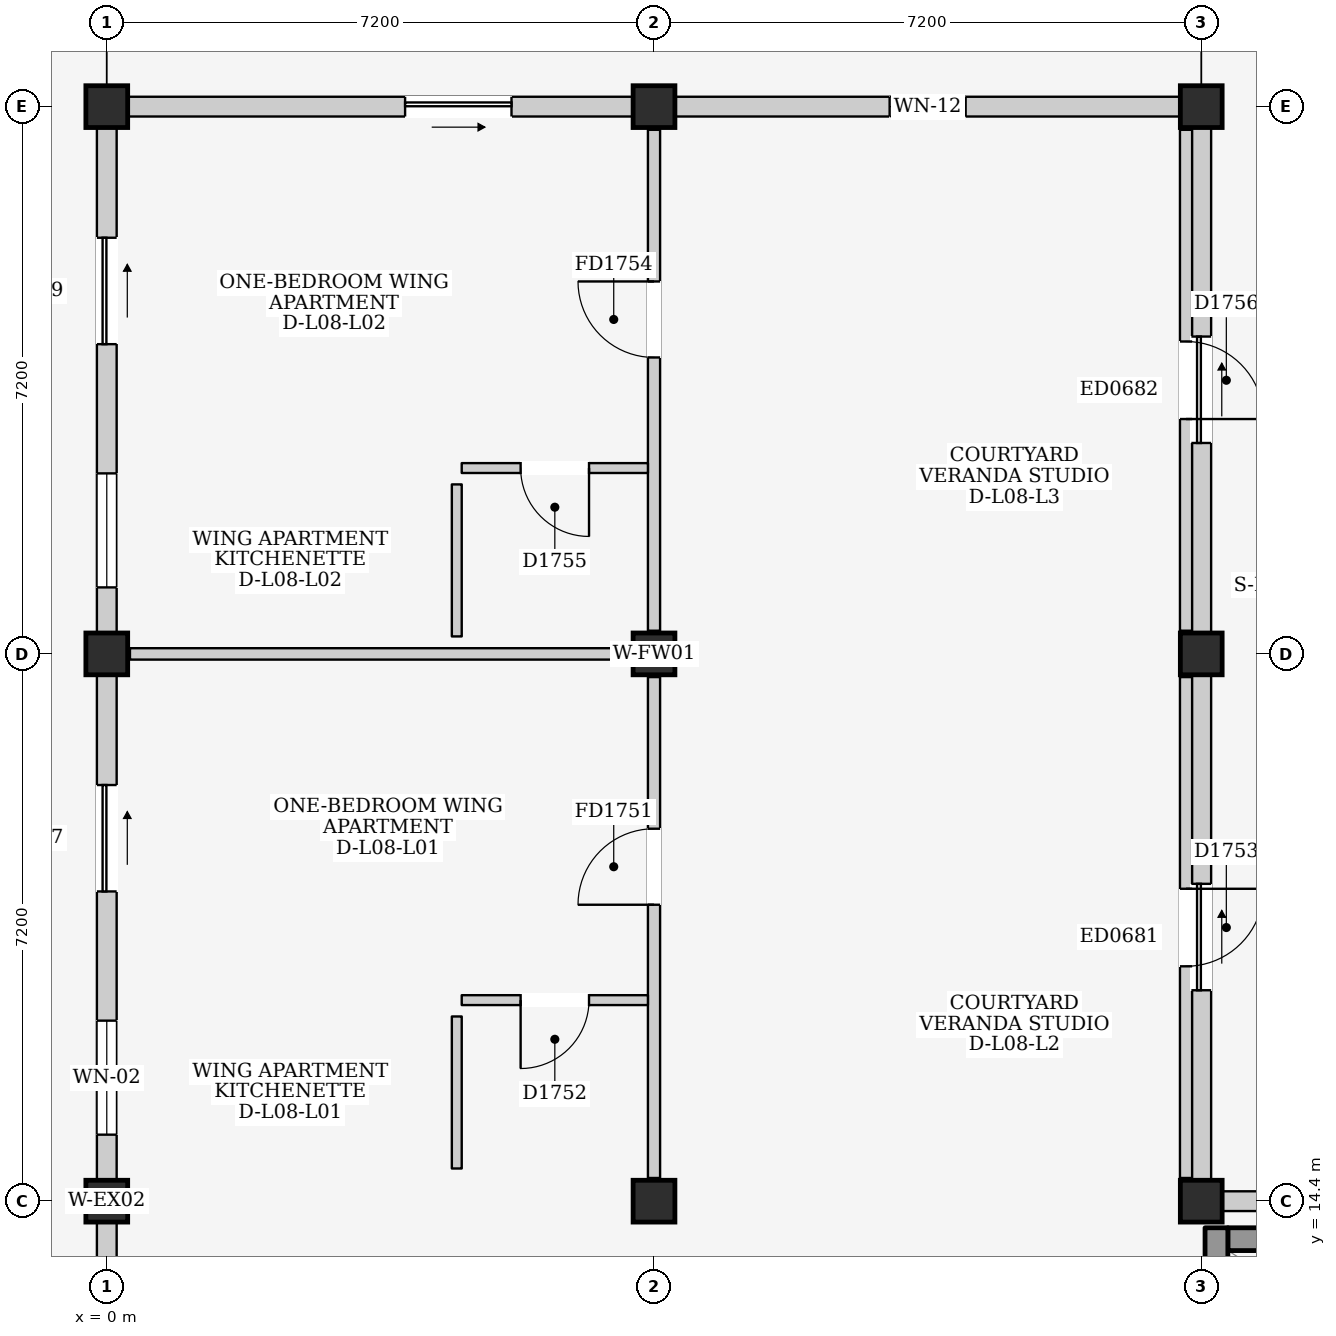
"""IFC4 building model, lengths in metres.
Left out: names, types, materials, properties, quantities, classifications, styles, units other than length and angle.
Written with IfcOpenShell. Run it as: python <this file> out.ifc"""

import sys

from ifc_helpers import new_model, si_unit, direction, frame, frame_2d, origin, origin_2d, place, context, subcontext, project, spatial, rectangle, extrude, element, fill, save


model = new_model("IFC4")
c1 = context("Model", 3, precision=1e-05, world=origin(), true_north=direction((0.0, 1.0)))
c2 = subcontext(c1, "Body", "Model", "MODEL_VIEW")
j1 = project(units=[si_unit("LENGTHUNIT", "METRE"), si_unit("PLANEANGLEUNIT", "RADIAN")], contexts=[c1])
p1 = place(None, origin())
s1 = spatial("IfcSite", under=j1, at=p1, CompositionType="ELEMENT")
p2 = place(p1, origin())
s2 = spatial("IfcBuilding", under=s1, at=p2, CompositionType="ELEMENT")
p3 = place(p2, frame((0.0, 0.0, 28.3)))
s3 = spatial("IfcBuildingStorey", under=s2, at=p3, CompositionType="ELEMENT", Elevation=28.3)
for number, where, z_axis, x_axis in (
    (1, (0.0, 14.4, 0.0), (0.0, 0.0, 1.0), (1.0, 0.0, 0.0)),
    (2, (0.0, 21.6, 0.0), (0.0, 0.0, 1.0), (1.0, 0.0, 0.0)),
    (3, (0.0, 28.8, 0.0), (0.0, 0.0, 1.0), (1.0, 0.0, 0.0)),
    (4, (7.2, 14.4, 0.0), (0.0, 0.0, 1.0), (1.0, 0.0, 0.0)),
    (5, (7.2, 21.6, 0.0), (0.0, 0.0, 1.0), (1.0, 0.0, 0.0)),
    (6, (7.2, 28.8, 0.0), (0.0, 0.0, 1.0), (1.0, 0.0, 0.0)),
    (7, (14.4, 14.4, 0.0), (0.0, 0.0, 1.0), (1.0, 0.0, 0.0)),
    (8, (14.4, 21.6, 0.0), (0.0, 0.0, 1.0), (1.0, 0.0, 0.0)),
    (9, (14.4, 28.8, 0.0), (0.0, 0.0, 1.0), (1.0, 0.0, 0.0)),
):
    element("IfcColumn", number, at=place(p3, frame(where, z_axis=z_axis, x_axis=x_axis)), inside=s3, PredefinedType="COLUMN", context=c2, shape_type="SweptSolid", body=[
        extrude(rectangle(XDim=0.55, YDim=0.55, at=origin_2d()), origin(), (0.0, 0.0, 1.0), 3.2),
    ])
p4 = place(p3, frame((0.0, 7.475, 0.0), z_axis=(0.0, 0.0, 1.0), x_axis=(0.0, 1.0, 0.0)))
e10 = element("IfcWall", 10, at=p4, inside=s3, PredefinedType="ELEMENTEDWALL", context=c2, shape_type="SweptSolid", body=[
    extrude(rectangle(XDim=6.65, YDim=0.26, at=frame_2d((3.325, 0.0))), origin(), (0.0, 0.0, 1.0), 2.495),
])
p5 = place(p4, frame((3.65, 0.0, 0.0)))
e11 = element("IfcOpeningElement", 11, at=p5, cuts=e10, PredefinedType="OPENING", context=c2, shape_type="SweptSolid", body=[
    extrude(rectangle(XDim=1.4, YDim=2.1, at=frame_2d((0.7, 1.05))), frame((0.0, 0.145, 0.0), z_axis=(0.0, -1.0, 0.0), x_axis=(1.0, 0.0, 0.0)), (0.0, 0.0, 1.0), 0.29),
])
p6 = place(p3, frame((0.0, 14.675, 0.0), z_axis=(0.0, 0.0, 1.0), x_axis=(0.0, 1.0, 0.0)))
e12 = element("IfcWall", 12, at=p6, inside=s3, PredefinedType="ELEMENTEDWALL", context=c2, shape_type="SweptSolid", body=[
    extrude(rectangle(XDim=6.65, YDim=0.26, at=frame_2d((3.325, 0.0))), origin(), (0.0, 0.0, 1.0), 2.495),
])
p7 = place(p6, frame((3.8, 0.0, 0.0)))
e13 = element("IfcOpeningElement", 13, at=p7, cuts=e12, PredefinedType="OPENING", context=c2, shape_type="SweptSolid", body=[
    extrude(rectangle(XDim=1.4, YDim=2.1, at=frame_2d((0.7, 1.05))), frame((0.0, 0.145, 0.0), z_axis=(0.0, -1.0, 0.0), x_axis=(1.0, 0.0, 0.0)), (0.0, 0.0, 1.0), 0.29),
])
p8 = place(p6, frame((0.6, 0.0, 0.88)))
e14 = element("IfcOpeningElement", 14, at=p8, cuts=e12, PredefinedType="OPENING", context=c2, shape_type="SweptSolid", body=[
    extrude(rectangle(XDim=1.5, YDim=1.5, at=frame_2d((0.75, 0.75))), frame((0.0, 0.145, 0.0), z_axis=(0.0, -1.0, 0.0), x_axis=(1.0, 0.0, 0.0)), (0.0, 0.0, 1.0), 0.29),
])
p9 = place(p3, frame((0.275, 28.8, 0.0), z_axis=(0.0, 0.0, 1.0), x_axis=(1.0, 0.0, 0.0)))
e15 = element("IfcWall", 15, at=p9, inside=s3, PredefinedType="ELEMENTEDWALL", context=c2, shape_type="SweptSolid", body=[
    extrude(rectangle(XDim=6.65, YDim=0.26, at=frame_2d((3.325, 0.0))), origin(), (0.0, 0.0, 1.0), 2.345),
])
p10 = place(p9, frame((3.65, 0.0, 0.0)))
e16 = element("IfcOpeningElement", 16, at=p10, cuts=e15, PredefinedType="OPENING", context=c2, shape_type="SweptSolid", body=[
    extrude(rectangle(XDim=1.4, YDim=2.1, at=frame_2d((0.7, 1.05))), frame((0.0, 0.145, 0.0), z_axis=(0.0, -1.0, 0.0), x_axis=(1.0, 0.0, 0.0)), (0.0, 0.0, 1.0), 0.29),
])
p11 = place(p3, frame((0.0, 21.875, 0.0), z_axis=(0.0, 0.0, 1.0), x_axis=(0.0, 1.0, 0.0)))
e17 = element("IfcWall", 17, at=p11, inside=s3, PredefinedType="ELEMENTEDWALL", context=c2, shape_type="SweptSolid", body=[
    extrude(rectangle(XDim=6.65, YDim=0.26, at=frame_2d((3.325, 0.0))), origin(), (0.0, 0.0, 1.0), 2.495),
])
p12 = place(p11, frame((3.8, 0.0, 0.0)))
e18 = element("IfcOpeningElement", 18, at=p12, cuts=e17, PredefinedType="OPENING", context=c2, shape_type="SweptSolid", body=[
    extrude(rectangle(XDim=1.4, YDim=2.1, at=frame_2d((0.7, 1.05))), frame((0.0, 0.145, 0.0), z_axis=(0.0, -1.0, 0.0), x_axis=(1.0, 0.0, 0.0)), (0.0, 0.0, 1.0), 0.29),
])
p13 = place(p11, frame((0.6, 0.0, 0.88)))
e19 = element("IfcOpeningElement", 19, at=p13, cuts=e17, PredefinedType="OPENING", context=c2, shape_type="SweptSolid", body=[
    extrude(rectangle(XDim=1.5, YDim=1.5, at=frame_2d((0.75, 0.75))), frame((0.0, 0.145, 0.0), z_axis=(0.0, -1.0, 0.0), x_axis=(1.0, 0.0, 0.0)), (0.0, 0.0, 1.0), 0.29),
])
p14 = place(p3, frame((14.4, 14.675, 0.0), z_axis=(0.0, 0.0, 1.0), x_axis=(0.0, 1.0, 0.0)))
e20 = element("IfcWall", 20, at=p14, inside=s3, PredefinedType="ELEMENTEDWALL", context=c2, shape_type="SweptSolid", body=[
    extrude(rectangle(XDim=6.65, YDim=0.26, at=frame_2d((3.325, 0.0))), origin(), (0.0, 0.0, 1.0), 2.445),
])
p15 = place(p14, frame((2.5, 0.0, 0.0)))
e21 = element("IfcOpeningElement", 21, at=p15, cuts=e20, PredefinedType="OPENING", context=c2, shape_type="SweptSolid", body=[
    extrude(rectangle(XDim=1.4, YDim=2.1, at=frame_2d((0.7, 1.05))), frame((0.0, 0.145, 0.0), z_axis=(0.0, -1.0, 0.0), x_axis=(1.0, 0.0, 0.0)), (0.0, 0.0, 1.0), 0.29),
])
p16 = place(p3, frame((7.475, 28.8, 0.0), z_axis=(0.0, 0.0, 1.0), x_axis=(1.0, 0.0, 0.0)))
e22 = element("IfcWall", 22, at=p16, inside=s3, PredefinedType="ELEMENTEDWALL", context=c2, shape_type="SweptSolid", body=[
    extrude(rectangle(XDim=6.65, YDim=0.26, at=frame_2d((3.325, 0.0))), origin(), (0.0, 0.0, 1.0), 2.345),
])
p17 = place(p16, frame((2.825, 0.0, 1.1)))
e23 = element("IfcOpeningElement", 23, at=p17, cuts=e22, PredefinedType="OPENING", context=c2, shape_type="SweptSolid", body=[
    extrude(rectangle(XDim=1.0, YDim=0.9, at=frame_2d((0.5, 0.45))), frame((0.0, 0.145, 0.0), z_axis=(0.0, -1.0, 0.0), x_axis=(1.0, 0.0, 0.0)), (0.0, 0.0, 1.0), 0.29),
])
p18 = place(p3, frame((14.4, 21.875, 0.0), z_axis=(0.0, 0.0, 1.0), x_axis=(0.0, 1.0, 0.0)))
e24 = element("IfcWall", 24, at=p18, inside=s3, PredefinedType="ELEMENTEDWALL", context=c2, shape_type="SweptSolid", body=[
    extrude(rectangle(XDim=6.65, YDim=0.26, at=frame_2d((3.325, 0.0))), origin(), (0.0, 0.0, 1.0), 2.445),
])
p19 = place(p18, frame((2.5, 0.0, 0.0)))
e25 = element("IfcOpeningElement", 25, at=p19, cuts=e24, PredefinedType="OPENING", context=c2, shape_type="SweptSolid", body=[
    extrude(rectangle(XDim=1.4, YDim=2.1, at=frame_2d((0.7, 1.05))), frame((0.0, 0.145, 0.0), z_axis=(0.0, -1.0, 0.0), x_axis=(1.0, 0.0, 0.0)), (0.0, 0.0, 1.0), 0.29),
])
p20 = place(p3, frame((14.675, 14.4, 0.0), z_axis=(0.0, 0.0, 1.0), x_axis=(1.0, 0.0, 0.0)))
e26 = element("IfcWall", 26, at=p20, inside=s3, PredefinedType="ELEMENTEDWALL", context=c2, shape_type="SweptSolid", body=[
    extrude(rectangle(XDim=6.65, YDim=0.26, at=frame_2d((3.325, 0.0))), origin(), (0.0, 0.0, 1.0), 2.345),
])
p21 = place(p20, frame((2.825, 0.0, 1.2)))
e27 = element("IfcOpeningElement", 27, at=p21, cuts=e26, PredefinedType="OPENING", context=c2, shape_type="SweptSolid", body=[
    extrude(rectangle(XDim=1.0, YDim=0.9, at=frame_2d((0.5, 0.45))), frame((0.0, 0.145, 0.0), z_axis=(0.0, -1.0, 0.0), x_axis=(1.0, 0.0, 0.0)), (0.0, 0.0, 1.0), 0.29),
])
p22 = place(p3, frame((14.75, 13.9, 0.0), z_axis=(0.0, 0.0, 1.0), x_axis=(1.0, 0.0, 0.0)))
e28 = element("IfcWall", 28, at=p22, inside=s3, PredefinedType="SHEAR", context=c2, shape_type="SweptSolid", body=[
    extrude(rectangle(XDim=6.5, YDim=0.3, at=frame_2d((3.25, 0.0))), origin(), (0.0, 0.0, 1.0), 2.95),
])
p23 = place(p3, frame((14.6, 10.45, 0.0), z_axis=(0.0, 0.0, 1.0), x_axis=(0.0, 1.0, 0.0)))
e29 = element("IfcWall", 29, at=p23, inside=s3, PredefinedType="SHEAR", context=c2, shape_type="SweptSolid", body=[
    extrude(rectangle(XDim=3.6, YDim=0.3, at=frame_2d((1.8, 0.0))), origin(), (0.0, 0.0, 1.0), 2.95),
])
p24 = place(p3, frame((7.2, 14.705, 0.0), z_axis=(0.0, 0.0, 1.0), x_axis=(0.0, 1.0, 0.0)))
e30 = element("IfcWall", 30, at=p24, inside=s3, PredefinedType="PARTITIONING", context=c2, shape_type="SweptSolid", body=[
    extrude(rectangle(XDim=6.59, YDim=0.16, at=frame_2d((3.295, 0.0))), origin(), (0.0, 0.0, 1.0), 2.445),
])
p25 = place(p24, frame((3.595, 0.0, 0.0)))
e31 = element("IfcOpeningElement", 31, at=p25, cuts=e30, PredefinedType="OPENING", context=c2, shape_type="SweptSolid", body=[
    extrude(rectangle(XDim=1.0, YDim=2.15, at=frame_2d((0.5, 1.075))), frame((0.0, 0.095, 0.0), z_axis=(0.0, -1.0, 0.0), x_axis=(1.0, 0.0, 0.0)), (0.0, 0.0, 1.0), 0.19),
])
p26 = place(p3, frame((0.305, 21.6, 0.0), z_axis=(0.0, 0.0, 1.0), x_axis=(1.0, 0.0, 0.0)))
e32 = element("IfcWall", 32, at=p26, inside=s3, PredefinedType="PARTITIONING", context=c2, shape_type="SweptSolid", body=[
    extrude(rectangle(XDim=6.59, YDim=0.15, at=frame_2d((3.295, 0.0))), origin(), (0.0, 0.0, 1.0), 2.345),
])
p27 = place(p3, frame((4.67, 17.045, 0.0), z_axis=(0.0, 0.0, 1.0), x_axis=(1.0, 0.0, 0.0)))
e33 = element("IfcWall", 33, at=p27, inside=s3, PredefinedType="PARTITIONING", context=c2, shape_type="SweptSolid", body=[
    extrude(rectangle(XDim=2.45, YDim=0.13, at=frame_2d((1.225, 0.0))), origin(), (0.0, 0.0, 1.0), 2.95),
])
p28 = place(p27, frame((0.775, 0.0, 0.0)))
e34 = element("IfcOpeningElement", 34, at=p28, cuts=e33, PredefinedType="OPENING", context=c2, shape_type="SweptSolid", body=[
    extrude(rectangle(XDim=0.9, YDim=2.1, at=frame_2d((0.45, 1.05))), frame((0.0, 0.08, 0.0), z_axis=(0.0, -1.0, 0.0), x_axis=(1.0, 0.0, 0.0)), (0.0, 0.0, 1.0), 0.16),
])
p29 = place(p3, frame((4.605, 14.83, 0.0), z_axis=(0.0, 0.0, 1.0), x_axis=(0.0, 1.0, 0.0)))
e35 = element("IfcWall", 35, at=p29, inside=s3, PredefinedType="PARTITIONING", context=c2, shape_type="SweptSolid", body=[
    extrude(rectangle(XDim=2.0, YDim=0.13, at=frame_2d((1.0, 0.0))), origin(), (0.0, 0.0, 1.0), 2.95),
])
p30 = place(p3, frame((14.2, 14.705, 0.0), z_axis=(0.0, 0.0, 1.0), x_axis=(0.0, 1.0, 0.0)))
e36 = element("IfcWall", 36, at=p30, inside=s3, PredefinedType="PARTITIONING", context=c2, shape_type="SweptSolid", body=[
    extrude(rectangle(XDim=6.59, YDim=0.16, at=frame_2d((3.295, 0.0))), origin(), (0.0, 0.0, 1.0), 2.95),
])
p31 = place(p30, frame((2.785, 0.0, 0.0)))
e37 = element("IfcOpeningElement", 37, at=p31, cuts=e36, PredefinedType="OPENING", context=c2, shape_type="SweptSolid", body=[
    extrude(rectangle(XDim=1.02, YDim=2.18, at=frame_2d((0.51, 1.09))), frame((0.0, 0.095, 0.0), z_axis=(0.0, -1.0, 0.0), x_axis=(1.0, 0.0, 0.0)), (0.0, 0.0, 1.0), 0.19),
])
p32 = place(p3, frame((7.2, 21.905, 0.0), z_axis=(0.0, 0.0, 1.0), x_axis=(0.0, 1.0, 0.0)))
e38 = element("IfcWall", 38, at=p32, inside=s3, PredefinedType="PARTITIONING", context=c2, shape_type="SweptSolid", body=[
    extrude(rectangle(XDim=6.59, YDim=0.16, at=frame_2d((3.295, 0.0))), origin(), (0.0, 0.0, 1.0), 2.445),
])
p33 = place(p32, frame((3.595, 0.0, 0.0)))
e39 = element("IfcOpeningElement", 39, at=p33, cuts=e38, PredefinedType="OPENING", context=c2, shape_type="SweptSolid", body=[
    extrude(rectangle(XDim=1.0, YDim=2.15, at=frame_2d((0.5, 1.075))), frame((0.0, 0.095, 0.0), z_axis=(0.0, -1.0, 0.0), x_axis=(1.0, 0.0, 0.0)), (0.0, 0.0, 1.0), 0.19),
])
p34 = place(p3, frame((4.67, 24.045, 0.0), z_axis=(0.0, 0.0, 1.0), x_axis=(1.0, 0.0, 0.0)))
e40 = element("IfcWall", 40, at=p34, inside=s3, PredefinedType="PARTITIONING", context=c2, shape_type="SweptSolid", body=[
    extrude(rectangle(XDim=2.45, YDim=0.13, at=frame_2d((1.225, 0.0))), origin(), (0.0, 0.0, 1.0), 2.95),
])
p35 = place(p34, frame((0.775, 0.0, 0.0)))
e41 = element("IfcOpeningElement", 41, at=p35, cuts=e40, PredefinedType="OPENING", context=c2, shape_type="SweptSolid", body=[
    extrude(rectangle(XDim=0.9, YDim=2.1, at=frame_2d((0.45, 1.05))), frame((0.0, 0.08, 0.0), z_axis=(0.0, -1.0, 0.0), x_axis=(1.0, 0.0, 0.0)), (0.0, 0.0, 1.0), 0.16),
])
p36 = place(p3, frame((4.605, 21.83, 0.0), z_axis=(0.0, 0.0, 1.0), x_axis=(0.0, 1.0, 0.0)))
e42 = element("IfcWall", 42, at=p36, inside=s3, PredefinedType="PARTITIONING", context=c2, shape_type="SweptSolid", body=[
    extrude(rectangle(XDim=2.0, YDim=0.13, at=frame_2d((1.0, 0.0))), origin(), (0.0, 0.0, 1.0), 2.95),
])
p37 = place(p3, frame((14.2, 21.905, 0.0), z_axis=(0.0, 0.0, 1.0), x_axis=(0.0, 1.0, 0.0)))
e43 = element("IfcWall", 43, at=p37, inside=s3, PredefinedType="PARTITIONING", context=c2, shape_type="SweptSolid", body=[
    extrude(rectangle(XDim=6.59, YDim=0.16, at=frame_2d((3.295, 0.0))), origin(), (0.0, 0.0, 1.0), 2.95),
])
p38 = place(p37, frame((2.785, 0.0, 0.0)))
e44 = element("IfcOpeningElement", 44, at=p38, cuts=e43, PredefinedType="OPENING", context=c2, shape_type="SweptSolid", body=[
    extrude(rectangle(XDim=1.02, YDim=2.18, at=frame_2d((0.51, 1.09))), frame((0.0, 0.095, 0.0), z_axis=(0.0, -1.0, 0.0), x_axis=(1.0, 0.0, 0.0)), (0.0, 0.0, 1.0), 0.19),
])
p39 = place(p7, frame((1.4, 0.0, 0.0), z_axis=(0.0, 0.0, 1.0), x_axis=(-1.0, 0.0, 0.0)))
e45 = element("IfcDoor", 45, at=p39, inside=s3, OperationType="SLIDING_TO_RIGHT", PredefinedType="DOOR", context=c2, shape_type="SweptSolid", body=[
    extrude(rectangle(XDim=1.4, YDim=2.1, at=frame_2d((0.7, 1.05))), frame((0.0, 0.025, 0.0), z_axis=(0.0, -1.0, 0.0), x_axis=(1.0, 0.0, 0.0)), (0.0, 0.0, 1.0), 0.05),
])
fill(e13, e45)
p40 = place(p8, origin())
e46 = element("IfcWindow", 46, at=p40, inside=s3, PartitioningType="DOUBLE_PANEL_VERTICAL", PredefinedType="WINDOW", context=c2, shape_type="SweptSolid", body=[
    extrude(rectangle(XDim=1.5, YDim=1.5, at=frame_2d((0.75, 0.75))), frame((0.0, 0.03, 0.0), z_axis=(0.0, -1.0, 0.0), x_axis=(1.0, 0.0, 0.0)), (0.0, 0.0, 1.0), 0.06),
])
fill(e14, e46)
p41 = place(p10, frame((1.4, 0.0, 0.0), z_axis=(0.0, 0.0, 1.0), x_axis=(-1.0, 0.0, 0.0)))
e47 = element("IfcDoor", 47, at=p41, inside=s3, OperationType="SLIDING_TO_RIGHT", PredefinedType="DOOR", context=c2, shape_type="SweptSolid", body=[
    extrude(rectangle(XDim=1.4, YDim=2.1, at=frame_2d((0.7, 1.05))), frame((0.0, 0.025, 0.0), z_axis=(0.0, -1.0, 0.0), x_axis=(1.0, 0.0, 0.0)), (0.0, 0.0, 1.0), 0.05),
])
fill(e16, e47)
p42 = place(p12, frame((1.4, 0.0, 0.0), z_axis=(0.0, 0.0, 1.0), x_axis=(-1.0, 0.0, 0.0)))
e48 = element("IfcDoor", 48, at=p42, inside=s3, OperationType="SLIDING_TO_RIGHT", PredefinedType="DOOR", context=c2, shape_type="SweptSolid", body=[
    extrude(rectangle(XDim=1.4, YDim=2.1, at=frame_2d((0.7, 1.05))), frame((0.0, 0.025, 0.0), z_axis=(0.0, -1.0, 0.0), x_axis=(1.0, 0.0, 0.0)), (0.0, 0.0, 1.0), 0.05),
])
fill(e18, e48)
p43 = place(p13, origin())
e49 = element("IfcWindow", 49, at=p43, inside=s3, PartitioningType="DOUBLE_PANEL_VERTICAL", PredefinedType="WINDOW", context=c2, shape_type="SweptSolid", body=[
    extrude(rectangle(XDim=1.5, YDim=1.5, at=frame_2d((0.75, 0.75))), frame((0.0, 0.03, 0.0), z_axis=(0.0, -1.0, 0.0), x_axis=(1.0, 0.0, 0.0)), (0.0, 0.0, 1.0), 0.06),
])
fill(e19, e49)
p44 = place(p15, frame((1.4, 0.0, 0.0), z_axis=(0.0, 0.0, 1.0), x_axis=(-1.0, 0.0, 0.0)))
e50 = element("IfcDoor", 50, at=p44, inside=s3, OperationType="SLIDING_TO_RIGHT", PredefinedType="DOOR", context=c2, shape_type="SweptSolid", body=[
    extrude(rectangle(XDim=1.4, YDim=2.1, at=frame_2d((0.7, 1.05))), frame((0.0, 0.025, 0.0), z_axis=(0.0, -1.0, 0.0), x_axis=(1.0, 0.0, 0.0)), (0.0, 0.0, 1.0), 0.05),
])
fill(e21, e50)
p45 = place(p17, origin())
e51 = element("IfcWindow", 51, at=p45, inside=s3, PartitioningType="SINGLE_PANEL", PredefinedType="WINDOW", context=c2, shape_type="SweptSolid", body=[
    extrude(rectangle(XDim=1.0, YDim=0.9, at=frame_2d((0.5, 0.45))), frame((0.0, 0.03, 0.0), z_axis=(0.0, -1.0, 0.0), x_axis=(1.0, 0.0, 0.0)), (0.0, 0.0, 1.0), 0.06),
])
fill(e23, e51)
p46 = place(p19, frame((1.4, 0.0, 0.0), z_axis=(0.0, 0.0, 1.0), x_axis=(-1.0, 0.0, 0.0)))
e52 = element("IfcDoor", 52, at=p46, inside=s3, OperationType="SLIDING_TO_RIGHT", PredefinedType="DOOR", context=c2, shape_type="SweptSolid", body=[
    extrude(rectangle(XDim=1.4, YDim=2.1, at=frame_2d((0.7, 1.05))), frame((0.0, 0.025, 0.0), z_axis=(0.0, -1.0, 0.0), x_axis=(1.0, 0.0, 0.0)), (0.0, 0.0, 1.0), 0.05),
])
fill(e25, e52)
p47 = place(p25, origin())
e53 = element("IfcDoor", 53, at=p47, inside=s3, OperationType="SINGLE_SWING_LEFT", PredefinedType="DOOR", context=c2, shape_type="SweptSolid", body=[
    extrude(rectangle(XDim=1.0, YDim=2.15, at=frame_2d((0.5, 1.075))), frame((0.0, 0.025, 0.0), z_axis=(0.0, -1.0, 0.0), x_axis=(1.0, 0.0, 0.0)), (0.0, 0.0, 1.0), 0.05),
])
fill(e31, e53)
p48 = place(p28, frame((0.9, 0.0, 0.0), z_axis=(0.0, 0.0, 1.0), x_axis=(-1.0, 0.0, 0.0)))
e54 = element("IfcDoor", 54, at=p48, inside=s3, OperationType="SINGLE_SWING_RIGHT", PredefinedType="DOOR", context=c2, shape_type="SweptSolid", body=[
    extrude(rectangle(XDim=0.9, YDim=2.1, at=frame_2d((0.45, 1.05))), frame((0.0, 0.025, 0.0), z_axis=(0.0, -1.0, 0.0), x_axis=(1.0, 0.0, 0.0)), (0.0, 0.0, 1.0), 0.05),
])
fill(e34, e54)
p49 = place(p31, frame((1.02, 0.0, 0.0), z_axis=(0.0, 0.0, 1.0), x_axis=(-1.0, 0.0, 0.0)))
e55 = element("IfcDoor", 55, at=p49, inside=s3, OperationType="SINGLE_SWING_LEFT", PredefinedType="DOOR", context=c2, shape_type="SweptSolid", body=[
    extrude(rectangle(XDim=1.02, YDim=2.18, at=frame_2d((0.51, 1.09))), frame((0.0, 0.025, 0.0), z_axis=(0.0, -1.0, 0.0), x_axis=(1.0, 0.0, 0.0)), (0.0, 0.0, 1.0), 0.05),
])
fill(e37, e55)
p50 = place(p33, origin())
e56 = element("IfcDoor", 56, at=p50, inside=s3, OperationType="SINGLE_SWING_RIGHT", PredefinedType="DOOR", context=c2, shape_type="SweptSolid", body=[
    extrude(rectangle(XDim=1.0, YDim=2.15, at=frame_2d((0.5, 1.075))), frame((0.0, 0.025, 0.0), z_axis=(0.0, -1.0, 0.0), x_axis=(1.0, 0.0, 0.0)), (0.0, 0.0, 1.0), 0.05),
])
fill(e39, e56)
p51 = place(p35, frame((0.9, 0.0, 0.0), z_axis=(0.0, 0.0, 1.0), x_axis=(-1.0, 0.0, 0.0)))
e57 = element("IfcDoor", 57, at=p51, inside=s3, OperationType="SINGLE_SWING_LEFT", PredefinedType="DOOR", context=c2, shape_type="SweptSolid", body=[
    extrude(rectangle(XDim=0.9, YDim=2.1, at=frame_2d((0.45, 1.05))), frame((0.0, 0.025, 0.0), z_axis=(0.0, -1.0, 0.0), x_axis=(1.0, 0.0, 0.0)), (0.0, 0.0, 1.0), 0.05),
])
fill(e41, e57)
p52 = place(p38, frame((1.02, 0.0, 0.0), z_axis=(0.0, 0.0, 1.0), x_axis=(-1.0, 0.0, 0.0)))
e58 = element("IfcDoor", 58, at=p52, inside=s3, OperationType="SINGLE_SWING_RIGHT", PredefinedType="DOOR", context=c2, shape_type="SweptSolid", body=[
    extrude(rectangle(XDim=1.02, YDim=2.18, at=frame_2d((0.51, 1.09))), frame((0.0, 0.025, 0.0), z_axis=(0.0, -1.0, 0.0), x_axis=(1.0, 0.0, 0.0)), (0.0, 0.0, 1.0), 0.05),
])
fill(e44, e58)
save(model, sys.argv[1])
